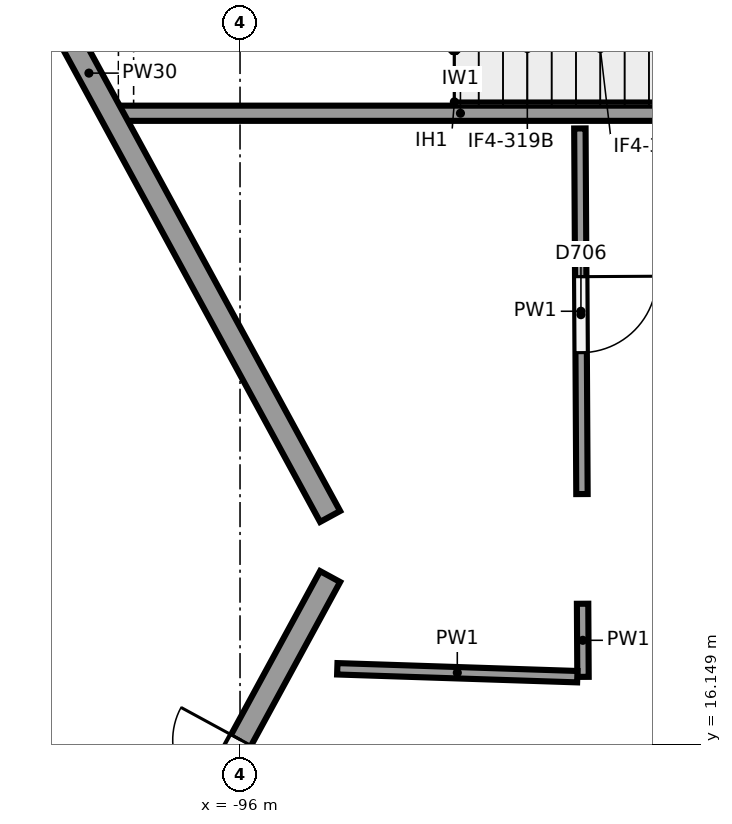
"""IFC4 building model, lengths in metres.
Left out: names, types, materials, properties, quantities, classifications, styles, units other than length and angle.
Written with IfcOpenShell. Run it as: python <this file> out.ifc"""

import sys

from ifc_helpers import new_model, si_unit, direction, frame, frame_2d, origin, origin_2d, place, context, subcontext, project, spatial, rectangle, circle, extrude, element, fill, save


model = new_model("IFC4")
c1 = context("Model", 3, precision=1e-05, world=origin(), true_north=direction((0.0, 1.0)))
c2 = subcontext(c1, "Body", "Model", "MODEL_VIEW")
j1 = project(units=[si_unit("LENGTHUNIT", "METRE"), si_unit("PLANEANGLEUNIT", "RADIAN")], contexts=[c1])
p1 = place(None, origin())
s1 = spatial("IfcSite", under=j1, at=p1, CompositionType="ELEMENT")
p2 = place(p1, origin())
s2 = spatial("IfcBuilding", under=s1, at=p2, CompositionType="ELEMENT")
p3 = place(p2, frame((0.0, 0.0, 12.0)))
s3 = spatial("IfcBuildingStorey", under=s2, at=p3, CompositionType="ELEMENT", Elevation=12.0)
p4 = place(p3, frame((-94.6, 18.75, 0.0), z_axis=(0.0, 0.0, 1.0), x_axis=(1.0, 0.0, 0.0)))
e1 = element("IfcColumn", 1, at=p4, inside=s3, PredefinedType="COLUMN", context=c2, shape_type="SweptSolid", body=[
    extrude(circle(Radius=0.45, at=origin_2d()), origin(), (0.0, 0.0, 1.0), 6.0),
])
p5 = place(p3, frame((-98.6, 18.75, 0.0), z_axis=(0.0, 0.0, 1.0), x_axis=(1.0, 0.0, 0.0)))
e2 = element("IfcColumn", 2, at=p5, inside=s3, PredefinedType="COLUMN", context=c2, shape_type="SweptSolid", body=[
    extrude(circle(Radius=0.4, at=origin_2d()), origin(), (0.0, 0.0, 1.0), 6.0),
])
p6 = place(p3, frame((-94.815, 19.145, 0.0), z_axis=(0.0, 0.0, 1.0), x_axis=(-0.477867771117, 0.878431780691, 0.0)))
e3 = element("IfcWall", 3, at=p6, inside=s3, PredefinedType="SOLIDWALL", context=c2, shape_type="SweptSolid", body=[
    extrude(rectangle(XDim=13.28, YDim=0.3, at=frame_2d((6.64, 0.0))), origin(), (0.0, 0.0, 1.0), 4.35),
])
p7 = place(p3, frame((-101.161, 6.689, 0.0), z_axis=(0.0, 0.0, 1.0), x_axis=(0.477867771117, 0.878431780691, 0.0)))
e4 = element("IfcWall", 4, at=p7, inside=s3, PredefinedType="SOLIDWALL", context=c2, shape_type="SweptSolid", body=[
    extrude(rectangle(XDim=13.28, YDim=0.3, at=frame_2d((6.64, 0.0))), origin(), (0.0, 0.0, 1.0), 4.35),
])
p8 = place(p7, frame((9.03, 0.0, 0.0)))
e5 = element("IfcOpeningElement", 5, at=p8, cuts=e4, PredefinedType="OPENING", context=c2, shape_type="SweptSolid", body=[
    extrude(rectangle(XDim=1.8, YDim=2.4, at=frame_2d((0.9, 1.2))), frame((0.0, 0.16, 0.0), z_axis=(0.0, -1.0, 0.0), x_axis=(1.0, 0.0, 0.0)), (0.0, 0.0, 1.0), 0.32),
])
p9 = place(p3, frame((-97.6, 24.45, 0.0), z_axis=(0.0, 0.0, 1.0), x_axis=(1.0, 0.0, 0.0)))
e6 = element("IfcWall", 6, at=p9, inside=s3, PredefinedType="SHEAR", context=c2, shape_type="SweptSolid", body=[
    extrude(rectangle(XDim=9.0, YDim=0.2, at=frame_2d((4.5, 0.0))), origin(), (0.0, 0.0, 1.0), 5.65),
])
p10 = place(p3, frame((-97.5, 31.15, 0.0), z_axis=(0.0, 0.0, 1.0), x_axis=(0.0, -1.0, 0.0)))
e7 = element("IfcWall", 7, at=p10, inside=s3, PredefinedType="SHEAR", context=c2, shape_type="SweptSolid", body=[
    extrude(rectangle(XDim=6.6, YDim=0.2, at=frame_2d((3.3, 0.0))), origin(), (0.0, 0.0, 1.0), 5.65),
])
p11 = place(p3, frame((-91.529, 24.25, 0.0), z_axis=(0.0, 0.0, 1.0), x_axis=(0.00568461021, -0.999983842473, 0.0)))
e8 = element("IfcWall", 8, at=p11, inside=s3, PredefinedType="PARTITIONING", context=c2, shape_type="SweptSolid", body=[
    extrude(rectangle(XDim=4.81, YDim=0.15, at=frame_2d((2.405, 0.0))), origin(), (0.0, 0.0, 1.0), 5.65),
])
p12 = place(p11, frame((1.95, 0.0, 0.0)))
e9 = element("IfcOpeningElement", 9, at=p12, cuts=e8, PredefinedType="OPENING", context=c2, shape_type="SweptSolid", body=[
    extrude(rectangle(XDim=1.0, YDim=2.1, at=frame_2d((0.5, 1.05))), frame((0.0, 0.085, 0.0), z_axis=(0.0, -1.0, 0.0), x_axis=(1.0, 0.0, 0.0)), (0.0, 0.0, 1.0), 0.17),
])
p13 = place(p3, frame((-91.493, 17.997, 0.0), z_axis=(0.0, 0.0, 1.0), x_axis=(0.00558225253, -0.999984419107, 0.0)))
e10 = element("IfcWall", 10, at=p13, inside=s3, PredefinedType="PARTITIONING", context=c2, shape_type="SweptSolid", body=[
    extrude(rectangle(XDim=0.962, YDim=0.15, at=frame_2d((0.481, 0.0))), origin(), (0.0, 0.0, 1.0), 5.65),
])
p14 = place(p3, frame((-91.562, 17.037, 0.0), z_axis=(0.0, 0.0, 1.0), x_axis=(-0.999458119876, 0.032916054045, 0.0)))
e11 = element("IfcWall", 11, at=p14, inside=s3, PredefinedType="PARTITIONING", context=c2, shape_type="SweptSolid", body=[
    extrude(rectangle(XDim=3.16, YDim=0.15, at=frame_2d((1.58, 0.0))), origin(), (0.0, 0.0, 1.0), 5.65),
])
p15 = place(p8, origin())
e12 = element("IfcDoor", 12, at=p15, inside=s3, OperationType="DOUBLE_DOOR_SINGLE_SWING", PredefinedType="DOOR", context=c2, shape_type="SweptSolid", body=[
    extrude(rectangle(XDim=1.8, YDim=2.4, at=frame_2d((0.9, 1.2))), frame((0.0, 0.025, 0.0), z_axis=(0.0, -1.0, 0.0), x_axis=(1.0, 0.0, 0.0)), (0.0, 0.0, 1.0), 0.05),
])
fill(e5, e12)
p16 = place(p12, origin())
e13 = element("IfcDoor", 13, at=p16, inside=s3, OperationType="SINGLE_SWING_LEFT", PredefinedType="DOOR", context=c2, shape_type="SweptSolid", body=[
    extrude(rectangle(XDim=1.0, YDim=2.1, at=frame_2d((0.5, 1.05))), frame((0.0, 0.025, 0.0), z_axis=(0.0, -1.0, 0.0), x_axis=(1.0, 0.0, 0.0)), (0.0, 0.0, 1.0), 0.05),
])
fill(e9, e13)
save(model, sys.argv[1])
